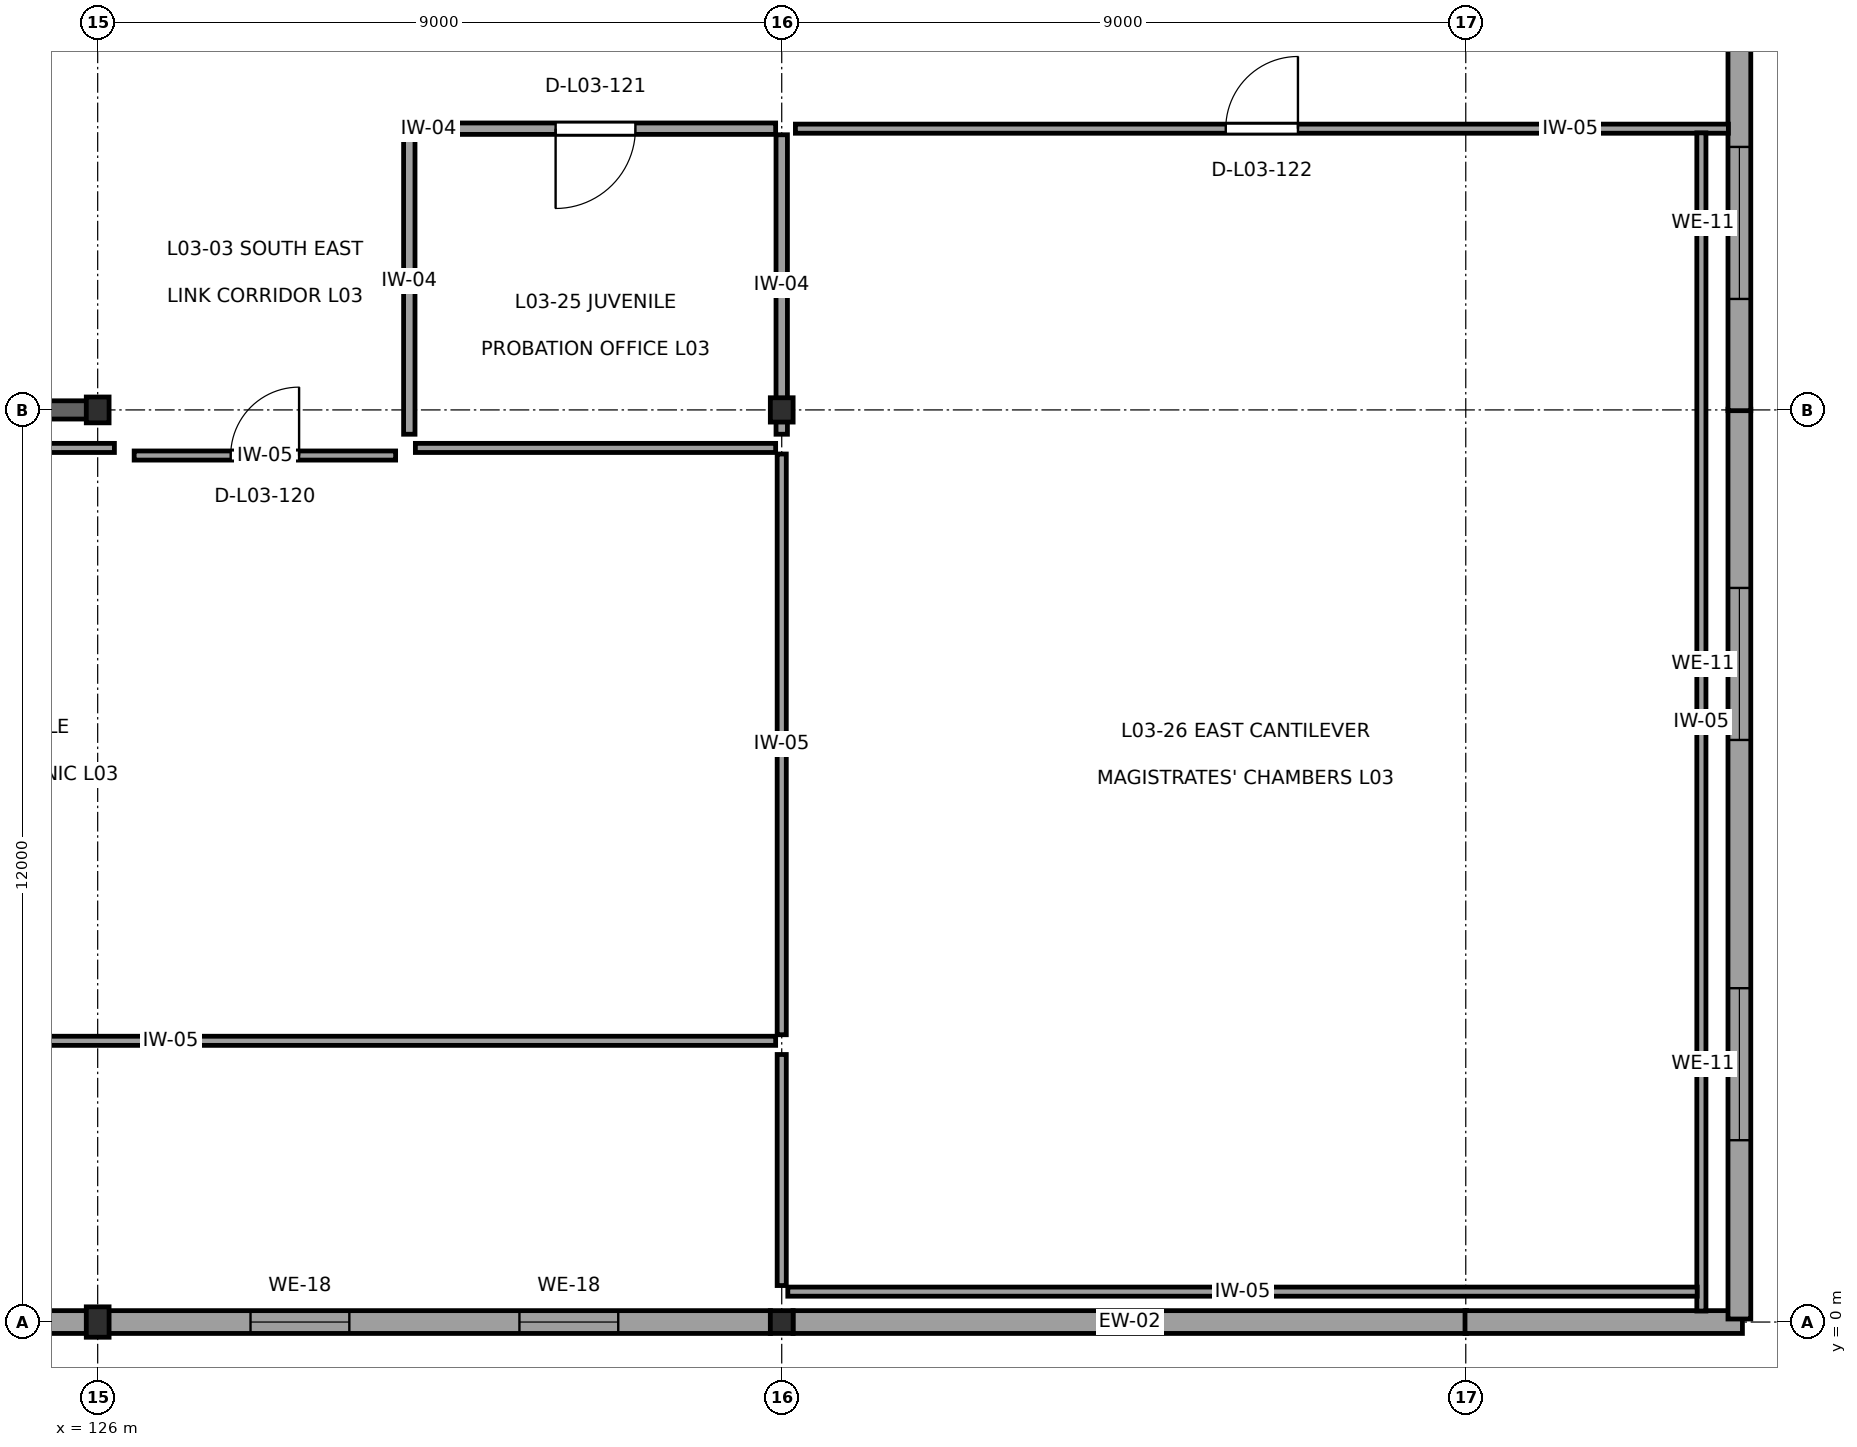
"""IFC4 building model, lengths in metres.
Left out: names, types, materials, properties, quantities, classifications, styles, units other than length and angle.
Written with IfcOpenShell. Run it as: python <this file> out.ifc"""

import sys

from ifc_helpers import new_model, si_unit, direction, frame, frame_2d, origin, origin_2d, place, context, subcontext, project, spatial, rectangle, i_section, extrude, element, fill, save


model = new_model("IFC4")
c1 = context("Model", 3, precision=1e-05, world=origin(), true_north=direction((0.0, 1.0)))
c2 = subcontext(c1, "Body", "Model", "MODEL_VIEW")
j1 = project(units=[si_unit("LENGTHUNIT", "METRE"), si_unit("PLANEANGLEUNIT", "RADIAN")], contexts=[c1])
p1 = place(None, origin())
s1 = spatial("IfcSite", under=j1, at=p1, CompositionType="ELEMENT")
p2 = place(p1, origin())
s2 = spatial("IfcBuilding", under=s1, at=p2, CompositionType="ELEMENT")
p3 = place(p2, frame((0.0, 0.0, 14.4)))
s3 = spatial("IfcBuildingStorey", under=s2, at=p3, CompositionType="ELEMENT", Elevation=14.4)
p4 = place(p3, frame((126.0, 0.0, 0.0), z_axis=(0.0, 0.0, 1.0), x_axis=(1.0, 0.0, 0.0)))
e1 = element("IfcColumn", 1, at=p4, inside=s3, PredefinedType="COLUMN", context=c2, shape_type="SweptSolid", body=[
    extrude(i_section(OverallWidth=0.3, OverallDepth=0.4, WebThickness=0.013, FlangeThickness=0.024, at=origin_2d()), origin(), (0.0, 0.0, 1.0), 4.5),
])
p5 = place(p3, frame((126.0, 12.0, 0.0), z_axis=(0.0, 0.0, 1.0), x_axis=(1.0, 0.0, 0.0)))
e2 = element("IfcColumn", 2, at=p5, inside=s3, PredefinedType="COLUMN", context=c2, shape_type="SweptSolid", body=[
    extrude(i_section(OverallWidth=0.3, OverallDepth=0.34, WebThickness=0.012, FlangeThickness=0.021, at=origin_2d()), origin(), (0.0, 0.0, 1.0), 4.5),
])
p6 = place(p3, frame((135.0, 0.0, 0.0), z_axis=(0.0, 0.0, 1.0), x_axis=(0.0, 1.0, 0.0)))
e3 = element("IfcColumn", 3, at=p6, inside=s3, PredefinedType="COLUMN", context=c2, shape_type="SweptSolid", body=[
    extrude(i_section(OverallWidth=0.3, OverallDepth=0.3, WebThickness=0.011, FlangeThickness=0.019, at=origin_2d()), origin(), (0.0, 0.0, 1.0), 4.5),
])
p7 = place(p3, frame((135.0, 12.0, 0.0), z_axis=(0.0, 0.0, 1.0), x_axis=(1.0, 0.0, 0.0)))
e4 = element("IfcColumn", 4, at=p7, inside=s3, PredefinedType="COLUMN", context=c2, shape_type="SweptSolid", body=[
    extrude(i_section(OverallWidth=0.3, OverallDepth=0.32, WebThickness=0.011, FlangeThickness=0.021, at=origin_2d()), origin(), (0.0, 0.0, 1.0), 4.5),
])
p8 = place(p3, frame((117.008, 0.0, 0.0), z_axis=(0.0, 0.0, 1.0), x_axis=(1.0, 0.0, 0.0)))
e5 = element("IfcWall", 5, at=p8, inside=s3, PredefinedType="SOLIDWALL", context=c2, shape_type="SweptSolid", body=[
    extrude(rectangle(XDim=8.984, YDim=0.3, at=frame_2d((4.492, 0.0))), origin(), (0.0, 0.0, 1.0), 3.167),
])
p9 = place(p8, frame((2.045, 0.0, 0.9)))
e6 = element("IfcOpeningElement", 6, at=p9, cuts=e5, PredefinedType="OPENING", context=c2, shape_type="SweptSolid", body=[
    extrude(rectangle(XDim=1.3, YDim=1.3, at=frame_2d((0.65, 0.65))), frame((0.0, 0.165, 0.0), z_axis=(0.0, -1.0, 0.0), x_axis=(1.0, 0.0, 0.0)), (0.0, 0.0, 1.0), 0.33),
])
p10 = place(p8, frame((5.639, 0.0, 0.9)))
e7 = element("IfcOpeningElement", 7, at=p10, cuts=e5, PredefinedType="OPENING", context=c2, shape_type="SweptSolid", body=[
    extrude(rectangle(XDim=1.3, YDim=1.3, at=frame_2d((0.65, 0.65))), frame((0.0, 0.165, 0.0), z_axis=(0.0, -1.0, 0.0), x_axis=(1.0, 0.0, 0.0)), (0.0, 0.0, 1.0), 0.33),
])
p11 = place(p3, frame((126.008, 0.0, 0.0), z_axis=(0.0, 0.0, 1.0), x_axis=(1.0, 0.0, 0.0)))
e8 = element("IfcWall", 8, at=p11, inside=s3, PredefinedType="SOLIDWALL", context=c2, shape_type="SweptSolid", body=[
    extrude(rectangle(XDim=8.844, YDim=0.3, at=frame_2d((4.422, 0.0))), origin(), (0.0, 0.0, 1.0), 3.167),
])
p12 = place(p11, frame((2.003, 0.0, 0.9)))
e9 = element("IfcOpeningElement", 9, at=p12, cuts=e8, PredefinedType="OPENING", context=c2, shape_type="SweptSolid", body=[
    extrude(rectangle(XDim=1.3, YDim=1.3, at=frame_2d((0.65, 0.65))), frame((0.0, 0.165, 0.0), z_axis=(0.0, -1.0, 0.0), x_axis=(1.0, 0.0, 0.0)), (0.0, 0.0, 1.0), 0.33),
])
p13 = place(p11, frame((5.541, 0.0, 0.9)))
e10 = element("IfcOpeningElement", 10, at=p13, cuts=e8, PredefinedType="OPENING", context=c2, shape_type="SweptSolid", body=[
    extrude(rectangle(XDim=1.3, YDim=1.3, at=frame_2d((0.65, 0.65))), frame((0.0, 0.165, 0.0), z_axis=(0.0, -1.0, 0.0), x_axis=(1.0, 0.0, 0.0)), (0.0, 0.0, 1.0), 0.33),
])
p14 = place(p3, frame((135.148, 0.0, 0.0), z_axis=(0.0, 0.0, 1.0), x_axis=(1.0, 0.0, 0.0)))
e11 = element("IfcWall", 11, at=p14, inside=s3, PredefinedType="SOLIDWALL", context=c2, shape_type="SweptSolid", body=[
    extrude(rectangle(XDim=8.862, YDim=0.3, at=frame_2d((4.431, 0.0))), origin(), (0.0, 0.0, 1.0), 3.167),
])
p15 = place(p3, frame((143.99, 0.0, 0.0), z_axis=(0.0, 0.0, 1.0), x_axis=(1.0, 0.0, 0.0)))
e12 = element("IfcWall", 12, at=p15, inside=s3, PredefinedType="SOLIDWALL", context=c2, shape_type="SweptSolid", body=[
    extrude(rectangle(XDim=3.65, YDim=0.3, at=frame_2d((1.825, 0.0))), origin(), (0.0, 0.0, 1.0), 3.167),
])
p16 = place(p3, frame((147.6, 0.04, 0.0), z_axis=(0.0, 0.0, 1.0), x_axis=(0.0, 1.0, 0.0)))
e13 = element("IfcWall", 13, at=p16, inside=s3, PredefinedType="SOLIDWALL", context=c2, shape_type="SweptSolid", body=[
    extrude(rectangle(XDim=11.97, YDim=0.3, at=frame_2d((5.985, 0.0))), origin(), (0.0, 0.0, 1.0), 3.475),
])
p17 = place(p16, frame((2.352, 0.0, 0.85)))
e14 = element("IfcOpeningElement", 14, at=p17, cuts=e13, PredefinedType="OPENING", context=c2, shape_type="SweptSolid", body=[
    extrude(rectangle(XDim=2.0, YDim=2.0, at=frame_2d((1.0, 1.0))), frame((0.0, 0.165, 0.0), z_axis=(0.0, -1.0, 0.0), x_axis=(1.0, 0.0, 0.0)), (0.0, 0.0, 1.0), 0.33),
])
p18 = place(p16, frame((7.618, 0.0, 0.85)))
e15 = element("IfcOpeningElement", 15, at=p18, cuts=e13, PredefinedType="OPENING", context=c2, shape_type="SweptSolid", body=[
    extrude(rectangle(XDim=2.0, YDim=2.0, at=frame_2d((1.0, 1.0))), frame((0.0, 0.165, 0.0), z_axis=(0.0, -1.0, 0.0), x_axis=(1.0, 0.0, 0.0)), (0.0, 0.0, 1.0), 0.33),
])
p19 = place(p3, frame((147.6, 11.99, 0.0), z_axis=(0.0, 0.0, 1.0), x_axis=(0.0, 1.0, 0.0)))
e16 = element("IfcWall", 16, at=p19, inside=s3, PredefinedType="SOLIDWALL", context=c2, shape_type="SweptSolid", body=[
    extrude(rectangle(XDim=12.05, YDim=0.3, at=frame_2d((6.025, 0.0))), origin(), (0.0, 0.0, 1.0), 3.475),
])
p20 = place(p19, frame((1.47, 0.0, 0.85)))
e17 = element("IfcOpeningElement", 17, at=p20, cuts=e16, PredefinedType="OPENING", context=c2, shape_type="SweptSolid", body=[
    extrude(rectangle(XDim=2.0, YDim=2.0, at=frame_2d((1.0, 1.0))), frame((0.0, 0.165, 0.0), z_axis=(0.0, -1.0, 0.0), x_axis=(1.0, 0.0, 0.0)), (0.0, 0.0, 1.0), 0.33),
])
p21 = place(p19, frame((7.676, 0.0, 0.85)))
e18 = element("IfcOpeningElement", 18, at=p21, cuts=e16, PredefinedType="OPENING", context=c2, shape_type="SweptSolid", body=[
    extrude(rectangle(XDim=2.0, YDim=2.0, at=frame_2d((1.0, 1.0))), frame((0.0, 0.165, 0.0), z_axis=(0.0, -1.0, 0.0), x_axis=(1.0, 0.0, 0.0)), (0.0, 0.0, 1.0), 0.33),
])
p22 = place(p3, frame((117.198, 12.0, 0.0), z_axis=(0.0, 0.0, 1.0), x_axis=(1.0, 0.0, 0.0)))
e19 = element("IfcWall", 19, at=p22, inside=s3, PredefinedType="SHEAR", context=c2, shape_type="SweptSolid", body=[
    extrude(rectangle(XDim=8.794, YDim=0.24, at=frame_2d((4.397, 0.0))), origin(), (0.0, 0.0, 1.0), 3.575),
])
p23 = place(p3, frame((130.18, 11.5, 0.0), z_axis=(0.0, 0.0, 1.0), x_axis=(1.0, 0.0, 0.0)))
e20 = element("IfcWall", 20, at=p23, inside=s3, PredefinedType="PARTITIONING", context=c2, shape_type="SweptSolid", body=[
    extrude(rectangle(XDim=4.74, YDim=0.12, at=frame_2d((2.37, 0.0))), origin(), (0.0, 0.0, 1.0), 4.14),
])
p24 = place(p3, frame((135.0, 11.42, 0.0), z_axis=(0.0, 0.0, 1.0), x_axis=(0.0, -1.0, 0.0)))
e21 = element("IfcWall", 21, at=p24, inside=s3, PredefinedType="PARTITIONING", context=c2, shape_type="SweptSolid", body=[
    extrude(rectangle(XDim=7.64, YDim=0.12, at=frame_2d((3.82, 0.0))), origin(), (0.0, 0.0, 1.0), 3.785),
])
p25 = place(p3, frame((134.92, 3.7, 0.0), z_axis=(0.0, 0.0, 1.0), x_axis=(-1.0, 0.0, 0.0)))
e22 = element("IfcWall", 22, at=p25, inside=s3, PredefinedType="PARTITIONING", context=c2, shape_type="SweptSolid", body=[
    extrude(rectangle(XDim=17.64, YDim=0.12, at=frame_2d((8.82, 0.0))), origin(), (0.0, 0.0, 1.0), 4.14),
])
p26 = place(p3, frame((116.795, 11.5, 0.0), z_axis=(0.0, 0.0, 1.0), x_axis=(1.0, 0.0, 0.0)))
e23 = element("IfcWall", 23, at=p26, inside=s3, PredefinedType="PARTITIONING", context=c2, shape_type="SweptSolid", body=[
    extrude(rectangle(XDim=9.425, YDim=0.12, at=frame_2d((4.712, 0.0))), origin(), (0.0, 0.0, 1.0), 4.14),
])
p27 = place(p3, frame((126.48, 11.4, 0.0), z_axis=(0.0, 0.0, 1.0), x_axis=(1.0, 0.0, 0.0)))
e24 = element("IfcWall", 24, at=p27, inside=s3, PredefinedType="PARTITIONING", context=c2, shape_type="SweptSolid", body=[
    extrude(rectangle(XDim=3.44, YDim=0.12, at=frame_2d((1.72, 0.0))), origin(), (0.0, 0.0, 1.0), 4.14),
])
p28 = place(p27, frame((1.27, 0.0, 0.0)))
e25 = element("IfcOpeningElement", 25, at=p28, cuts=e24, PredefinedType="OPENING", context=c2, shape_type="SweptSolid", body=[
    extrude(rectangle(XDim=0.9, YDim=2.1, at=frame_2d((0.45, 1.05))), frame((0.0, 0.075, 0.0), z_axis=(0.0, -1.0, 0.0), x_axis=(1.0, 0.0, 0.0)), (0.0, 0.0, 1.0), 0.15),
])
p29 = place(p3, frame((130.1, 11.68, 0.0), z_axis=(0.0, 0.0, 1.0), x_axis=(0.0, 1.0, 0.0)))
e26 = element("IfcWall", 26, at=p29, inside=s3, PredefinedType="PARTITIONING", context=c2, shape_type="SweptSolid", body=[
    extrude(rectangle(XDim=3.94, YDim=0.15, at=frame_2d((1.97, 0.0))), origin(), (0.0, 0.0, 1.0), 4.14),
])
p30 = place(p3, frame((130.18, 15.7, 0.0), z_axis=(0.0, 0.0, 1.0), x_axis=(1.0, 0.0, 0.0)))
e27 = element("IfcWall", 27, at=p30, inside=s3, PredefinedType="PARTITIONING", context=c2, shape_type="SweptSolid", body=[
    extrude(rectangle(XDim=4.74, YDim=0.15, at=frame_2d((2.37, 0.0))), origin(), (0.0, 0.0, 1.0), 4.14),
])
p31 = place(p30, frame((1.845, 0.0, 0.0)))
e28 = element("IfcOpeningElement", 28, at=p31, cuts=e27, PredefinedType="OPENING", context=c2, shape_type="SweptSolid", body=[
    extrude(rectangle(XDim=1.05, YDim=2.25, at=frame_2d((0.525, 1.125))), frame((0.0, 0.09, 0.0), z_axis=(0.0, -1.0, 0.0), x_axis=(1.0, 0.0, 0.0)), (0.0, 0.0, 1.0), 0.18),
])
p32 = place(p3, frame((135.0, 15.62, 0.0), z_axis=(0.0, 0.0, 1.0), x_axis=(0.0, -1.0, 0.0)))
e29 = element("IfcWall", 29, at=p32, inside=s3, PredefinedType="PARTITIONING", context=c2, shape_type="SweptSolid", body=[
    extrude(rectangle(XDim=3.94, YDim=0.15, at=frame_2d((1.97, 0.0))), origin(), (0.0, 0.0, 1.0), 3.785),
])
p33 = place(p3, frame((135.18, 15.7, 0.0), z_axis=(0.0, 0.0, 1.0), x_axis=(1.0, 0.0, 0.0)))
e30 = element("IfcWall", 30, at=p33, inside=s3, PredefinedType="PARTITIONING", context=c2, shape_type="SweptSolid", body=[
    extrude(rectangle(XDim=12.275, YDim=0.12, at=frame_2d((6.138, 0.0))), origin(), (0.0, 0.0, 1.0), 4.14),
])
p34 = place(p33, frame((5.662, 0.0, 0.0)))
e31 = element("IfcOpeningElement", 31, at=p34, cuts=e30, PredefinedType="OPENING", context=c2, shape_type="SweptSolid", body=[
    extrude(rectangle(XDim=0.95, YDim=2.15, at=frame_2d((0.475, 1.075))), frame((0.0, 0.075, 0.0), z_axis=(0.0, -1.0, 0.0), x_axis=(1.0, 0.0, 0.0)), (0.0, 0.0, 1.0), 0.15),
])
p35 = place(p3, frame((147.1, 15.645, 0.0), z_axis=(0.0, 0.0, 1.0), x_axis=(0.0, -1.0, 0.0)))
e32 = element("IfcWall", 32, at=p35, inside=s3, PredefinedType="PARTITIONING", context=c2, shape_type="SweptSolid", body=[
    extrude(rectangle(XDim=15.5, YDim=0.12, at=frame_2d((7.75, 0.0))), origin(), (0.0, 0.0, 1.0), 4.14),
])
p36 = place(p3, frame((147.045, 0.4, 0.0), z_axis=(0.0, 0.0, 1.0), x_axis=(-1.0, 0.0, 0.0)))
e33 = element("IfcWall", 33, at=p36, inside=s3, PredefinedType="PARTITIONING", context=c2, shape_type="SweptSolid", body=[
    extrude(rectangle(XDim=11.965, YDim=0.12, at=frame_2d((5.982, 0.0))), origin(), (0.0, 0.0, 1.0), 4.14),
])
p37 = place(p3, frame((135.0, 0.48, 0.0), z_axis=(0.0, 0.0, 1.0), x_axis=(0.0, 1.0, 0.0)))
e34 = element("IfcWall", 34, at=p37, inside=s3, PredefinedType="PARTITIONING", context=c2, shape_type="SweptSolid", body=[
    extrude(rectangle(XDim=3.04, YDim=0.12, at=frame_2d((1.52, 0.0))), origin(), (0.0, 0.0, 1.0), 3.785),
])
p38 = place(p12, origin())
e35 = element("IfcWindow", 35, at=p38, inside=s3, PartitioningType="SINGLE_PANEL", PredefinedType="WINDOW", context=c2, shape_type="SweptSolid", body=[
    extrude(rectangle(XDim=1.3, YDim=1.3, at=frame_2d((0.65, 0.65))), frame((0.0, 0.03, 0.0), z_axis=(0.0, -1.0, 0.0), x_axis=(1.0, 0.0, 0.0)), (0.0, 0.0, 1.0), 0.06),
])
fill(e9, e35)
p39 = place(p13, origin())
e36 = element("IfcWindow", 36, at=p39, inside=s3, PartitioningType="SINGLE_PANEL", PredefinedType="WINDOW", context=c2, shape_type="SweptSolid", body=[
    extrude(rectangle(XDim=1.3, YDim=1.3, at=frame_2d((0.65, 0.65))), frame((0.0, 0.03, 0.0), z_axis=(0.0, -1.0, 0.0), x_axis=(1.0, 0.0, 0.0)), (0.0, 0.0, 1.0), 0.06),
])
fill(e10, e36)
p40 = place(p17, origin())
e37 = element("IfcWindow", 37, at=p40, inside=s3, PartitioningType="SINGLE_PANEL", PredefinedType="WINDOW", context=c2, shape_type="SweptSolid", body=[
    extrude(rectangle(XDim=2.0, YDim=2.0, at=frame_2d((1.0, 1.0))), frame((0.0, 0.03, 0.0), z_axis=(0.0, -1.0, 0.0), x_axis=(1.0, 0.0, 0.0)), (0.0, 0.0, 1.0), 0.06),
])
fill(e14, e37)
p41 = place(p18, origin())
e38 = element("IfcWindow", 38, at=p41, inside=s3, PartitioningType="SINGLE_PANEL", PredefinedType="WINDOW", context=c2, shape_type="SweptSolid", body=[
    extrude(rectangle(XDim=2.0, YDim=2.0, at=frame_2d((1.0, 1.0))), frame((0.0, 0.03, 0.0), z_axis=(0.0, -1.0, 0.0), x_axis=(1.0, 0.0, 0.0)), (0.0, 0.0, 1.0), 0.06),
])
fill(e15, e38)
p42 = place(p20, origin())
e39 = element("IfcWindow", 39, at=p42, inside=s3, PartitioningType="SINGLE_PANEL", PredefinedType="WINDOW", context=c2, shape_type="SweptSolid", body=[
    extrude(rectangle(XDim=2.0, YDim=2.0, at=frame_2d((1.0, 1.0))), frame((0.0, 0.03, 0.0), z_axis=(0.0, -1.0, 0.0), x_axis=(1.0, 0.0, 0.0)), (0.0, 0.0, 1.0), 0.06),
])
fill(e17, e39)
p43 = place(p28, origin())
e40 = element("IfcDoor", 40, at=p43, inside=s3, OperationType="SINGLE_SWING_RIGHT", PredefinedType="DOOR", context=c2, shape_type="SweptSolid", body=[
    extrude(rectangle(XDim=0.9, YDim=2.1, at=frame_2d((0.45, 1.05))), frame((0.0, 0.025, 0.0), z_axis=(0.0, -1.0, 0.0), x_axis=(1.0, 0.0, 0.0)), (0.0, 0.0, 1.0), 0.05),
])
fill(e25, e40)
p44 = place(p31, frame((1.05, 0.0, 0.0), z_axis=(0.0, 0.0, 1.0), x_axis=(-1.0, 0.0, 0.0)))
e41 = element("IfcDoor", 41, at=p44, inside=s3, OperationType="SINGLE_SWING_LEFT", PredefinedType="DOOR", context=c2, shape_type="SweptSolid", body=[
    extrude(rectangle(XDim=1.05, YDim=2.25, at=frame_2d((0.525, 1.125))), frame((0.0, 0.025, 0.0), z_axis=(0.0, -1.0, 0.0), x_axis=(1.0, 0.0, 0.0)), (0.0, 0.0, 1.0), 0.05),
])
fill(e28, e41)
p45 = place(p34, origin())
e42 = element("IfcDoor", 42, at=p45, inside=s3, OperationType="SINGLE_SWING_RIGHT", PredefinedType="DOOR", context=c2, shape_type="SweptSolid", body=[
    extrude(rectangle(XDim=0.95, YDim=2.15, at=frame_2d((0.475, 1.075))), frame((0.0, 0.025, 0.0), z_axis=(0.0, -1.0, 0.0), x_axis=(1.0, 0.0, 0.0)), (0.0, 0.0, 1.0), 0.05),
])
fill(e31, e42)
save(model, sys.argv[1])
